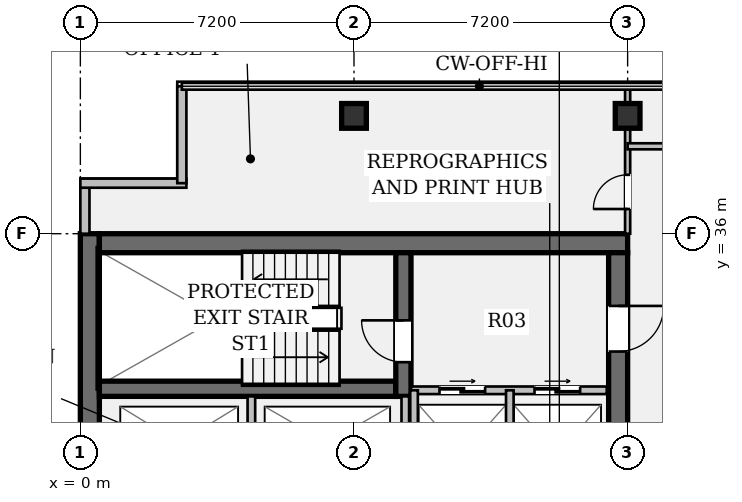
"""IFC4 building model, lengths in metres.
Left out: names, types, materials, properties, quantities, classifications, styles, units other than length and angle.
Written with IfcOpenShell. Run it as: python <this file> out.ifc"""

import sys

from ifc_helpers import new_model, si_unit, direction, frame, frame_2d, origin, origin_2d, place, context, subcontext, project, spatial, rectangle, hollow_rectangle, extrude, element, fill, save


model = new_model("IFC4")
c1 = context("Model", 3, precision=1e-05, world=origin(), true_north=direction((0.0, 1.0)))
c2 = subcontext(c1, "Body", "Model", "MODEL_VIEW")
j1 = project(units=[si_unit("LENGTHUNIT", "METRE"), si_unit("PLANEANGLEUNIT", "RADIAN")], contexts=[c1])
p1 = place(None, origin())
s1 = spatial("IfcSite", under=j1, at=p1, CompositionType="ELEMENT")
p2 = place(p1, origin())
s2 = spatial("IfcBuilding", under=s1, at=p2, CompositionType="ELEMENT")
p3 = place(p2, frame((0.0, 0.0, 251.65)))
s3 = spatial("IfcBuildingStorey", under=s2, at=p3, CompositionType="ELEMENT", Elevation=251.65)
p4 = place(p3, frame((0.25, 7.2, 0.0), z_axis=(0.0, 0.0, 1.0), x_axis=(0.0, 1.0, 0.0)))
e1 = element("IfcWall", 1, at=p4, inside=s3, PredefinedType="SHEAR", context=c2, shape_type="SweptSolid", body=[
    extrude(rectangle(XDim=28.8, YDim=0.5, at=frame_2d((14.4, 0.0))), origin(), (0.0, 0.0, 1.0), 3.24),
])
p5 = place(p3, frame((0.5, 35.75, 0.0), z_axis=(0.0, 0.0, 1.0), x_axis=(1.0, 0.0, 0.0)))
e2 = element("IfcWall", 2, at=p5, inside=s3, PredefinedType="SHEAR", context=c2, shape_type="SweptSolid", body=[
    extrude(rectangle(XDim=13.9, YDim=0.5, at=frame_2d((6.95, 0.0))), origin(), (0.0, 0.0, 1.0), 3.24),
])
p6 = place(p3, frame((14.15, 35.5, 0.0), z_axis=(0.0, 0.0, 1.0), x_axis=(0.0, -1.0, 0.0)))
e3 = element("IfcWall", 3, at=p6, inside=s3, PredefinedType="SHEAR", context=c2, shape_type="SweptSolid", body=[
    extrude(rectangle(XDim=27.8, YDim=0.5, at=frame_2d((13.9, 0.0))), origin(), (0.0, 0.0, 1.0), 3.24),
])
p7 = place(p6, frame((1.4, 0.0, 0.0)))
e4 = element("IfcOpeningElement", 4, at=p7, cuts=e3, PredefinedType="OPENING", context=c2, shape_type="SweptSolid", body=[
    extrude(rectangle(XDim=1.2, YDim=2.15, at=frame_2d((0.6, 1.075))), frame((0.0, 0.262, 0.0), z_axis=(0.0, -1.0, 0.0), x_axis=(1.0, 0.0, 0.0)), (0.0, 0.0, 1.0), 0.524),
])
p8 = place(p6, frame((25.35, 0.0, 0.0)))
e5 = element("IfcOpeningElement", 5, at=p8, cuts=e3, PredefinedType="OPENING", context=c2, shape_type="SweptSolid", body=[
    extrude(rectangle(XDim=1.2, YDim=2.15, at=frame_2d((0.6, 1.075))), frame((0.0, 0.262, 0.0), z_axis=(0.0, -1.0, 0.0), x_axis=(1.0, 0.0, 0.0)), (0.0, 0.0, 1.0), 0.524),
])
p9 = place(p6, frame((14.7, 0.0, 0.0)))
e6 = element("IfcOpeningElement", 6, at=p9, cuts=e3, PredefinedType="OPENING", context=c2, shape_type="SweptSolid", body=[
    extrude(rectangle(XDim=1.6, YDim=2.2, at=frame_2d((0.8, 1.1))), frame((0.0, 0.262, 0.0), z_axis=(0.0, -1.0, 0.0), x_axis=(1.0, 0.0, 0.0)), (0.0, 0.0, 1.0), 0.524),
])
p10 = place(p3, frame((0.5, 31.92, 0.0), z_axis=(0.0, 0.0, 1.0), x_axis=(1.0, 0.0, 0.0)))
e7 = element("IfcWall", 7, at=p10, inside=s3, PredefinedType="SHEAR", context=c2, shape_type="SweptSolid", body=[
    extrude(rectangle(XDim=7.8, YDim=0.4, at=frame_2d((3.9, 0.0))), origin(), (0.0, 0.0, 1.0), 3.24),
])
p11 = place(p3, frame((8.5, 31.72, 0.0), z_axis=(0.0, 0.0, 1.0), x_axis=(0.0, 1.0, 0.0)))
e8 = element("IfcWall", 8, at=p11, inside=s3, PredefinedType="SHEAR", context=c2, shape_type="SweptSolid", body=[
    extrude(rectangle(XDim=3.78, YDim=0.4, at=frame_2d((1.89, 0.0))), origin(), (0.0, 0.0, 1.0), 3.24),
])
p12 = place(p11, frame((0.9, 0.0, 0.0)))
e9 = element("IfcOpeningElement", 9, at=p12, cuts=e8, PredefinedType="OPENING", context=c2, shape_type="SweptSolid", body=[
    extrude(rectangle(XDim=1.1, YDim=2.15, at=frame_2d((0.55, 1.075))), frame((0.0, 0.212, 0.0), z_axis=(0.0, -1.0, 0.0), x_axis=(1.0, 0.0, 0.0)), (0.0, 0.0, 1.0), 0.424),
])
for number, where, z_axis, x_axis in (
    (10, (7.2, 39.1, 0.0), (0.0, 0.0, 1.0), (1.0, 0.0, 0.0)),
    (11, (14.4, 39.1, 0.0), (0.0, 0.0, 1.0), (1.0, 0.0, 0.0)),
):
    element("IfcColumn", number, at=place(p3, frame(where, z_axis=z_axis, x_axis=x_axis)), inside=s3, PredefinedType="COLUMN", context=c2, shape_type="SweptSolid", body=[
        extrude(hollow_rectangle(XDim=0.65, YDim=0.65, WallThickness=0.04, at=origin_2d()), origin(), (0.0, 0.0, 1.0), 3.24),
    ])
p13 = place(p3, frame((0.12, 36.0, 0.0), z_axis=(0.0, 0.0, 1.0), x_axis=(0.0, 1.0, 0.0)))
e12 = element("IfcWall", 12, at=p13, inside=s3, PredefinedType="STANDARD", context=c2, shape_type="SweptSolid", body=[
    extrude(rectangle(XDim=1.33, YDim=0.24, at=frame_2d((0.665, 0.0))), origin(), (0.0, 0.0, 1.0), 3.24),
])
p14 = place(p3, frame((0.0, 37.33, 0.0), z_axis=(0.0, 0.0, 1.0), x_axis=(1.0, 0.0, 0.0)))
e13 = element("IfcWall", 13, at=p14, inside=s3, PredefinedType="STANDARD", context=c2, shape_type="SweptSolid", body=[
    extrude(rectangle(XDim=2.79, YDim=0.24, at=frame_2d((1.395, 0.0))), origin(), (0.0, 0.0, 1.0), 3.24),
])
p15 = place(p3, frame((2.67, 37.33, 0.0), z_axis=(0.0, 0.0, 1.0), x_axis=(0.0, 1.0, 0.0)))
e14 = element("IfcWall", 14, at=p15, inside=s3, PredefinedType="STANDARD", context=c2, shape_type="SweptSolid", body=[
    extrude(rectangle(XDim=2.55, YDim=0.24, at=frame_2d((1.275, 0.0))), origin(), (0.0, 0.0, 1.0), 3.24),
])
p16 = place(p3, frame((8.7, 31.88, 0.0), z_axis=(0.0, 0.0, 1.0), x_axis=(1.0, 0.0, 0.0)))
e15 = element("IfcWall", 15, at=p16, inside=s3, PredefinedType="PARTITIONING", context=c2, shape_type="SweptSolid", body=[
    extrude(rectangle(XDim=5.15, YDim=0.2, at=frame_2d((2.575, 0.0))), origin(), (0.0, 0.0, 1.0), 3.24),
])
p17 = place(p16, frame((0.75, 0.0, 0.0)))
e16 = element("IfcOpeningElement", 16, at=p17, cuts=e15, PredefinedType="OPENING", context=c2, shape_type="SweptSolid", body=[
    extrude(rectangle(XDim=1.2, YDim=2.2, at=frame_2d((0.6, 1.1))), frame((0.0, 0.112, 0.0), z_axis=(0.0, -1.0, 0.0), x_axis=(1.0, 0.0, 0.0)), (0.0, 0.0, 1.0), 0.224),
])
p18 = place(p16, frame((3.25, 0.0, 0.0)))
e17 = element("IfcOpeningElement", 17, at=p18, cuts=e15, PredefinedType="OPENING", context=c2, shape_type="SweptSolid", body=[
    extrude(rectangle(XDim=1.2, YDim=2.2, at=frame_2d((0.6, 1.1))), frame((0.0, 0.112, 0.0), z_axis=(0.0, -1.0, 0.0), x_axis=(1.0, 0.0, 0.0)), (0.0, 0.0, 1.0), 0.224),
])
for number, where, z_axis, x_axis in (
    (18, (8.78, 28.78, 0.0), (0.0, 0.0, 1.0), (0.0, 1.0, 0.0)),
    (19, (11.3, 28.78, 0.0), (0.0, 0.0, 1.0), (0.0, 1.0, 0.0)),
):
    element("IfcWall", number, at=place(p3, frame(where, z_axis=z_axis, x_axis=x_axis)), inside=s3, PredefinedType="PARTITIONING", context=c2, shape_type="SweptSolid", body=[
        extrude(rectangle(XDim=3.1, YDim=0.2, at=frame_2d((1.55, 0.0))), origin(), (0.0, 0.0, 1.0), 3.24),
    ])
for number, where, z_axis, x_axis in (
    (20, (4.5, 28.78, 0.0), (0.0, 0.0, 1.0), (0.0, 1.0, 0.0)),
    (21, (8.55, 28.78, 0.0), (0.0, 0.0, 1.0), (0.0, 1.0, 0.0)),
):
    element("IfcWall", number, at=place(p3, frame(where, z_axis=z_axis, x_axis=x_axis)), inside=s3, PredefinedType="PARTITIONING", context=c2, shape_type="SweptSolid", body=[
        extrude(rectangle(XDim=2.94, YDim=0.2, at=frame_2d((1.47, 0.0))), origin(), (0.0, 0.0, 1.0), 3.24),
    ])
p19 = place(p3, frame((14.4, 36.0, 0.0), z_axis=(0.0, 0.0, 1.0), x_axis=(0.0, 1.0, 0.0)))
e22 = element("IfcWall", 22, at=p19, inside=s3, PredefinedType="PARTITIONING", context=c2, shape_type="SweptSolid", body=[
    extrude(rectangle(XDim=3.88, YDim=0.135, at=frame_2d((1.94, 0.0))), origin(), (0.0, 0.0, 1.0), 2.676),
])
p20 = place(p19, frame((0.65, 0.0, 0.0)))
e23 = element("IfcOpeningElement", 23, at=p20, cuts=e22, PredefinedType="OPENING", context=c2, shape_type="SweptSolid", body=[
    extrude(rectangle(XDim=0.9, YDim=2.15, at=frame_2d((0.45, 1.075))), frame((0.0, 0.08, 0.0), z_axis=(0.0, -1.0, 0.0), x_axis=(1.0, 0.0, 0.0)), (0.0, 0.0, 1.0), 0.159),
])
p21 = place(p3, frame((14.4, 38.3, 0.0), z_axis=(0.0, 0.0, 1.0), x_axis=(1.0, 0.0, 0.0)))
e24 = element("IfcWall", 24, at=p21, inside=s3, PredefinedType="PARTITIONING", context=c2, shape_type="SweptSolid", body=[
    extrude(rectangle(XDim=2.95, YDim=0.16, at=frame_2d((1.475, 0.0))), origin(), (0.0, 0.0, 1.0), 3.24),
])
p22 = place(p21, frame((1.54, 0.0, 0.0)))
e25 = element("IfcOpeningElement", 25, at=p22, cuts=e24, PredefinedType="OPENING", context=c2, shape_type="SweptSolid", body=[
    extrude(rectangle(XDim=1.08, YDim=2.15, at=frame_2d((0.54, 1.075))), frame((0.0, 0.092, 0.0), z_axis=(0.0, -1.0, 0.0), x_axis=(1.0, 0.0, 0.0)), (0.0, 0.0, 1.0), 0.184),
])
p23 = place(p12, origin())
e26 = element("IfcDoor", 26, at=p23, inside=s3, OperationType="SINGLE_SWING_RIGHT", PredefinedType="DOOR", context=c2, shape_type="SweptSolid", body=[
    extrude(rectangle(XDim=1.1, YDim=2.15, at=frame_2d((0.55, 1.075))), frame((0.0, 0.025, 0.0), z_axis=(0.0, -1.0, 0.0), x_axis=(1.0, 0.0, 0.0)), (0.0, 0.0, 1.0), 0.05),
])
fill(e9, e26)
p24 = place(p7, origin())
e27 = element("IfcDoor", 27, at=p24, inside=s3, OperationType="SINGLE_SWING_LEFT", PredefinedType="DOOR", context=c2, shape_type="SweptSolid", body=[
    extrude(rectangle(XDim=1.2, YDim=2.15, at=frame_2d((0.6, 1.075))), frame((0.0, 0.025, 0.0), z_axis=(0.0, -1.0, 0.0), x_axis=(1.0, 0.0, 0.0)), (0.0, 0.0, 1.0), 0.05),
])
fill(e4, e27)
p25 = place(p17, origin())
e28 = element("IfcDoor", 28, at=p25, inside=s3, OperationType="DOUBLE_DOOR_SLIDING", PredefinedType="DOOR", context=c2, shape_type="SweptSolid", body=[
    extrude(rectangle(XDim=1.2, YDim=2.2, at=frame_2d((0.6, 1.1))), frame((0.0, 0.025, 0.0), z_axis=(0.0, -1.0, 0.0), x_axis=(1.0, 0.0, 0.0)), (0.0, 0.0, 1.0), 0.05),
])
fill(e16, e28)
p26 = place(p18, origin())
e29 = element("IfcDoor", 29, at=p26, inside=s3, OperationType="DOUBLE_DOOR_SLIDING", PredefinedType="DOOR", context=c2, shape_type="SweptSolid", body=[
    extrude(rectangle(XDim=1.2, YDim=2.2, at=frame_2d((0.6, 1.1))), frame((0.0, 0.025, 0.0), z_axis=(0.0, -1.0, 0.0), x_axis=(1.0, 0.0, 0.0)), (0.0, 0.0, 1.0), 0.05),
])
fill(e17, e29)
p27 = place(p20, origin())
e30 = element("IfcDoor", 30, at=p27, inside=s3, OperationType="SINGLE_SWING_LEFT", PredefinedType="DOOR", context=c2, shape_type="SweptSolid", body=[
    extrude(rectangle(XDim=0.9, YDim=2.15, at=frame_2d((0.45, 1.075))), frame((0.0, 0.025, 0.0), z_axis=(0.0, -1.0, 0.0), x_axis=(1.0, 0.0, 0.0)), (0.0, 0.0, 1.0), 0.05),
])
fill(e23, e30)
save(model, sys.argv[1])
